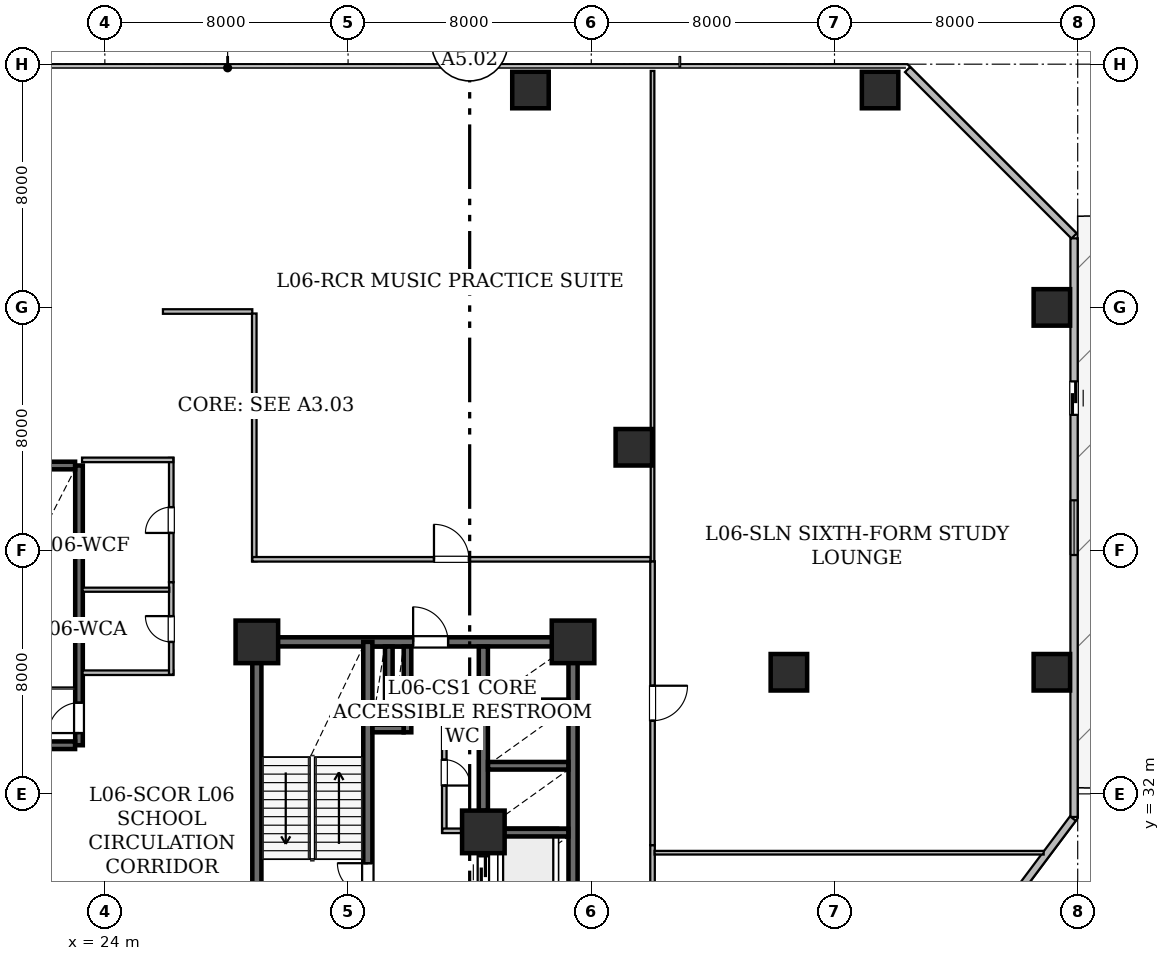
"""IFC4 building model, lengths in metres.
Left out: names, types, materials, properties, quantities, classifications, styles, units other than length and angle.
Written with IfcOpenShell. Run it as: python <this file> out.ifc"""

import sys

from ifc_helpers import new_model, si_unit, direction, frame, frame_2d, origin, origin_2d, place, context, subcontext, project, spatial, rectangle, hollow_rectangle, extrude, element, fill, save


model = new_model("IFC4")
c1 = context("Model", 3, precision=1e-05, world=origin(), true_north=direction((0.0, 1.0)))
c2 = subcontext(c1, "Body", "Model", "MODEL_VIEW")
j1 = project(units=[si_unit("LENGTHUNIT", "METRE"), si_unit("PLANEANGLEUNIT", "RADIAN")], contexts=[c1])
p1 = place(None, origin())
s1 = spatial("IfcSite", under=j1, at=p1, CompositionType="ELEMENT")
p2 = place(p1, origin())
s2 = spatial("IfcBuilding", under=s1, at=p2, CompositionType="ELEMENT")
p3 = place(p2, frame((0.0, 0.0, 28.8)))
s3 = spatial("IfcBuildingStorey", under=s2, at=p3, CompositionType="ELEMENT", Elevation=28.8)
for number, where, z_axis, x_axis in (
    (1, (29.0, 37.0, 0.0), (0.0, 0.0, 1.0), (1.0, 0.0, 0.0)),
    (2, (36.45, 30.75, 0.0), (0.0, 0.0, 1.0), (1.0, 0.0, 0.0)),
    (3, (39.4, 37.0, 0.0), (0.0, 0.0, 1.0), (1.0, 0.0, 0.0)),
):
    element("IfcColumn", number, at=place(p3, frame(where, z_axis=z_axis, x_axis=x_axis)), inside=s3, PredefinedType="COLUMN", context=c2, shape_type="SweptSolid", body=[
        extrude(hollow_rectangle(XDim=1.4, YDim=1.4, WallThickness=0.07, at=origin_2d()), origin(), (0.0, 0.0, 1.0), 4.5),
    ])
for number, where, z_axis, x_axis in (
    (4, (38.0, 55.15, 0.0), (0.0, 0.0, 1.0), (1.0, 0.0, 0.0)),
    (5, (49.5, 55.15, 0.0), (0.0, 0.0, 1.0), (1.0, 0.0, 0.0)),
    (6, (55.15, 36.0, 0.0), (0.0, 0.0, 1.0), (1.0, 0.0, 0.0)),
    (7, (55.15, 48.0, 0.0), (0.0, 0.0, 1.0), (1.0, 0.0, 0.0)),
    (8, (41.4, 43.4, 0.0), (0.0, 0.0, 1.0), (1.0, 0.0, 0.0)),
    (9, (46.5, 36.0, 0.0), (0.0, 0.0, 1.0), (1.0, 0.0, 0.0)),
):
    element("IfcColumn", number, at=place(p3, frame(where, z_axis=z_axis, x_axis=x_axis)), inside=s3, PredefinedType="COLUMN", context=c2, shape_type="SweptSolid", body=[
        extrude(hollow_rectangle(XDim=1.2, YDim=1.2, WallThickness=0.06, at=origin_2d()), origin(), (0.0, 0.0, 1.0), 4.475),
    ])
p4 = place(p3, frame((50.405, 55.825, 0.0), z_axis=(0.0, 0.0, 1.0), x_axis=(0.707106781187, -0.707106781187, 0.0)))
e10 = element("IfcWall", 10, at=p4, inside=s3, PredefinedType="STANDARD", context=c2, shape_type="SweptSolid", body=[
    extrude(rectangle(XDim=7.743, YDim=0.24, at=frame_2d((3.871, 0.0))), origin(), (0.0, 0.0, 1.0), 4.08),
])
p5 = place(p3, frame((55.88, 50.272, 0.0), z_axis=(0.0, 0.0, 1.0), x_axis=(0.0, -1.0, 0.0)))
e11 = element("IfcWall", 11, at=p5, inside=s3, PredefinedType="STANDARD", context=c2, shape_type="SweptSolid", body=[
    extrude(rectangle(XDim=19.032, YDim=0.24, at=frame_2d((9.516, 0.0))), origin(), (0.0, 0.0, 1.0), 4.08),
])
p6 = place(p5, frame((4.706, 0.0, 0.0)))
e12 = element("IfcOpeningElement", 12, at=p6, cuts=e11, PredefinedType="OPENING", context=c2, shape_type="SweptSolid", body=[
    extrude(rectangle(XDim=1.1, YDim=2.2, at=frame_2d((0.55, 1.1))), frame((0.0, 0.13, 0.0), z_axis=(0.0, -1.0, 0.0), x_axis=(1.0, 0.0, 0.0)), (0.0, 0.0, 1.0), 0.26),
])
p7 = place(p5, frame((8.616, 0.0, 0.85)))
e13 = element("IfcOpeningElement", 13, at=p7, cuts=e11, PredefinedType="OPENING", context=c2, shape_type="SweptSolid", body=[
    extrude(rectangle(XDim=1.8, YDim=0.92, at=frame_2d((0.9, 0.46))), frame((0.0, 0.13, 0.0), z_axis=(0.0, -1.0, 0.0), x_axis=(1.0, 0.0, 0.0)), (0.0, 0.0, 1.0), 0.26),
])
p8 = place(p3, frame((55.842, 31.189, 0.0), z_axis=(0.0, 0.0, 1.0), x_axis=(-0.600058791648, -0.799955902889, 0.0)))
e14 = element("IfcWall", 14, at=p8, inside=s3, PredefinedType="STANDARD", context=c2, shape_type="SweptSolid", body=[
    extrude(rectangle(XDim=3.986, YDim=0.24, at=frame_2d((1.993, 0.0))), origin(), (0.0, 0.0, 1.0), 4.08),
])
p9 = place(p3, frame((29.0, 28.0, 0.0), z_axis=(0.0, 0.0, 1.0), x_axis=(0.0, 1.0, 0.0)))
e15 = element("IfcWall", 15, at=p9, inside=s3, PredefinedType="SHEAR", context=c2, shape_type="SweptSolid", body=[
    extrude(rectangle(XDim=9.0, YDim=0.3, at=frame_2d((4.5, 0.0))), origin(), (0.0, 0.0, 1.0), 4.08),
])
p10 = place(p3, frame((29.0, 37.0, 0.0), z_axis=(0.0, 0.0, 1.0), x_axis=(1.0, 0.0, 0.0)))
e16 = element("IfcWall", 16, at=p10, inside=s3, PredefinedType="SHEAR", context=c2, shape_type="SweptSolid", body=[
    extrude(rectangle(XDim=10.4, YDim=0.3, at=frame_2d((5.2, 0.0))), origin(), (0.0, 0.0, 1.0), 4.08),
])
p11 = place(p10, frame((5.14, 0.0, 0.0)))
e17 = element("IfcOpeningElement", 17, at=p11, cuts=e16, PredefinedType="OPENING", context=c2, shape_type="SweptSolid", body=[
    extrude(rectangle(XDim=1.15, YDim=2.2, at=frame_2d((0.575, 1.1))), frame((0.0, 0.16, 0.0), z_axis=(0.0, -1.0, 0.0), x_axis=(1.0, 0.0, 0.0)), (0.0, 0.0, 1.0), 0.32),
])
p12 = place(p3, frame((39.4, 24.4, 0.0), z_axis=(0.0, 0.0, 1.0), x_axis=(0.0, 1.0, 0.0)))
e18 = element("IfcWall", 18, at=p12, inside=s3, PredefinedType="SHEAR", context=c2, shape_type="SweptSolid", body=[
    extrude(rectangle(XDim=12.6, YDim=0.3, at=frame_2d((6.3, 0.0))), origin(), (0.0, 0.0, 1.0), 4.08),
])
p13 = place(p3, frame((32.65, 28.0, 0.0), z_axis=(0.0, 0.0, 1.0), x_axis=(0.0, 1.0, 0.0)))
e19 = element("IfcWall", 19, at=p13, inside=s3, PredefinedType="SHEAR", context=c2, shape_type="SweptSolid", body=[
    extrude(rectangle(XDim=9.0, YDim=0.3, at=frame_2d((4.5, 0.0))), origin(), (0.0, 0.0, 1.0), 4.08),
])
p14 = place(p13, frame((0.72, 0.0, 0.0)))
e20 = element("IfcOpeningElement", 20, at=p14, cuts=e19, PredefinedType="OPENING", context=c2, shape_type="SweptSolid", body=[
    extrude(rectangle(XDim=1.0, YDim=2.15, at=frame_2d((0.5, 1.075))), frame((0.0, 0.16, 0.0), z_axis=(0.0, -1.0, 0.0), x_axis=(1.0, 0.0, 0.0)), (0.0, 0.0, 1.0), 0.32),
])
p15 = place(p3, frame((36.45, 25.1, 0.0), z_axis=(0.0, 0.0, 1.0), x_axis=(0.0, 1.0, 0.0)))
e21 = element("IfcWall", 21, at=p15, inside=s3, PredefinedType="SHEAR", context=c2, shape_type="SweptSolid", body=[
    extrude(rectangle(XDim=4.95, YDim=0.3, at=frame_2d((2.475, 0.0))), origin(), (0.0, 0.0, 1.0), 4.08),
])
p16 = place(p15, frame((0.12, 0.0, 0.0)))
e22 = element("IfcOpeningElement", 22, at=p16, cuts=e21, PredefinedType="OPENING", context=c2, shape_type="SweptSolid", body=[
    extrude(rectangle(XDim=1.05, YDim=2.15, at=frame_2d((0.525, 1.075))), frame((0.0, 0.16, 0.0), z_axis=(0.0, -1.0, 0.0), x_axis=(1.0, 0.0, 0.0)), (0.0, 0.0, 1.0), 0.32),
])
p17 = place(p15, frame((1.995, 0.0, 0.0)))
e23 = element("IfcOpeningElement", 23, at=p17, cuts=e21, PredefinedType="OPENING", context=c2, shape_type="SweptSolid", body=[
    extrude(rectangle(XDim=1.05, YDim=2.15, at=frame_2d((0.525, 1.075))), frame((0.0, 0.16, 0.0), z_axis=(0.0, -1.0, 0.0), x_axis=(1.0, 0.0, 0.0)), (0.0, 0.0, 1.0), 0.32),
])
p18 = place(p15, frame((3.795, 0.0, 0.0)))
e24 = element("IfcOpeningElement", 24, at=p18, cuts=e21, PredefinedType="OPENING", context=c2, shape_type="SweptSolid", body=[
    extrude(rectangle(XDim=1.05, YDim=2.15, at=frame_2d((0.525, 1.075))), frame((0.0, 0.16, 0.0), z_axis=(0.0, -1.0, 0.0), x_axis=(1.0, 0.0, 0.0)), (0.0, 0.0, 1.0), 0.32),
])
p19 = place(p3, frame((36.45, 31.45, 0.0), z_axis=(0.0, 0.0, 1.0), x_axis=(0.0, 1.0, 0.0)))
e25 = element("IfcWall", 25, at=p19, inside=s3, PredefinedType="SHEAR", context=c2, shape_type="SweptSolid", body=[
    extrude(rectangle(XDim=5.396, YDim=0.3, at=frame_2d((2.698, 0.0))), origin(), (0.0, 0.0, 1.0), 4.08),
])
for number, where, z_axis, x_axis in (
    (26, (36.604, 30.725, 0.0), (0.0, 0.0, 1.0), (1.0, 0.0, 0.0)),
    (27, (36.604, 32.925, 0.0), (0.0, 0.0, 1.0), (1.0, 0.0, 0.0)),
    (28, (36.604, 34.975, 0.0), (0.0, 0.0, 1.0), (1.0, 0.0, 0.0)),
):
    element("IfcWall", number, at=place(p3, frame(where, z_axis=z_axis, x_axis=x_axis)), inside=s3, PredefinedType="SHEAR", context=c2, shape_type="SweptSolid", body=[
        extrude(rectangle(XDim=2.642, YDim=0.25, at=frame_2d((1.321, 0.0))), origin(), (0.0, 0.0, 1.0), 4.08),
    ])
p20 = place(p3, frame((33.955, 34.025, 0.0), z_axis=(0.0, 0.0, 1.0), x_axis=(0.0, 1.0, 0.0)))
e29 = element("IfcWall", 29, at=p20, inside=s3, PredefinedType="SHEAR", context=c2, shape_type="SweptSolid", body=[
    extrude(rectangle(XDim=2.821, YDim=0.25, at=frame_2d((1.411, 0.0))), origin(), (0.0, 0.0, 1.0), 4.08),
])
p21 = place(p3, frame((32.804, 34.15, 0.0), z_axis=(0.0, 0.0, 1.0), x_axis=(1.0, 0.0, 0.0)))
e30 = element("IfcWall", 30, at=p21, inside=s3, PredefinedType="SHEAR", context=c2, shape_type="SweptSolid", body=[
    extrude(rectangle(XDim=1.022, YDim=0.25, at=frame_2d((0.511, 0.0))), origin(), (0.0, 0.0, 1.0), 4.08),
])
p22 = place(p3, frame((33.34, 34.279, 0.0), z_axis=(0.0, 0.0, 1.0), x_axis=(0.0, 1.0, 0.0)))
e31 = element("IfcWall", 31, at=p22, inside=s3, PredefinedType="SHEAR", context=c2, shape_type="SweptSolid", body=[
    extrude(rectangle(XDim=2.567, YDim=0.25, at=frame_2d((1.283, 0.0))), origin(), (0.0, 0.0, 1.0), 4.08),
])
p23 = place(p3, frame((23.15, 33.6, 0.0), z_axis=(0.0, 0.0, 1.0), x_axis=(0.0, 1.0, 0.0)))
e32 = element("IfcWall", 32, at=p23, inside=s3, PredefinedType="SHEAR", context=c2, shape_type="SweptSolid", body=[
    extrude(rectangle(XDim=9.2, YDim=0.25, at=frame_2d((4.6, 0.0))), origin(), (0.0, 0.0, 1.0), 4.08),
])
p24 = place(p23, frame((0.4, 0.0, 0.0)))
e33 = element("IfcOpeningElement", 33, at=p24, cuts=e32, PredefinedType="OPENING", context=c2, shape_type="SweptSolid", body=[
    extrude(rectangle(XDim=1.0, YDim=2.15, at=frame_2d((0.5, 1.075))), frame((0.0, 0.135, 0.0), z_axis=(0.0, -1.0, 0.0), x_axis=(1.0, 0.0, 0.0)), (0.0, 0.0, 1.0), 0.27),
])
for number, where, z_axis, x_axis in (
    (34, (19.329, 33.6, 0.0), (0.0, 0.0, 1.0), (1.0, 0.0, 0.0)),
    (35, (19.329, 42.8, 0.0), (0.0, 0.0, 1.0), (1.0, 0.0, 0.0)),
):
    element("IfcWall", number, at=place(p3, frame(where, z_axis=z_axis, x_axis=x_axis)), inside=s3, PredefinedType="SHEAR", context=c2, shape_type="SweptSolid", body=[
        extrude(rectangle(XDim=3.692, YDim=0.25, at=frame_2d((1.846, 0.0))), origin(), (0.0, 0.0, 1.0), 4.08),
    ])
p25 = place(p3, frame((36.306, 34.615, 0.0), z_axis=(0.0, 0.0, 1.0), x_axis=(-1.0, 0.0, 0.0)))
e36 = element("IfcWall", 36, at=p25, inside=s3, PredefinedType="STANDARD", context=c2, shape_type="SweptSolid", body=[
    extrude(rectangle(XDim=1.206, YDim=0.15, at=frame_2d((0.603, 0.0))), origin(), (0.0, 0.0, 1.0), 4.08),
])
p26 = place(p3, frame((35.165, 34.678, 0.0), z_axis=(0.0, 0.0, 1.0), x_axis=(0.0, -1.0, 0.0)))
e37 = element("IfcWall", 37, at=p26, inside=s3, PredefinedType="STANDARD", context=c2, shape_type="SweptSolid", body=[
    extrude(rectangle(XDim=3.958, YDim=0.15, at=frame_2d((1.979, 0.0))), origin(), (0.0, 0.0, 1.0), 4.08),
])
p27 = place(p26, frame((1.554, 0.0, 0.0)))
e38 = element("IfcOpeningElement", 38, at=p27, cuts=e37, PredefinedType="OPENING", context=c2, shape_type="SweptSolid", body=[
    extrude(rectangle(XDim=0.85, YDim=2.1, at=frame_2d((0.425, 1.05))), frame((0.0, 0.085, 0.0), z_axis=(0.0, -1.0, 0.0), x_axis=(1.0, 0.0, 0.0)), (0.0, 0.0, 1.0), 0.17),
])
p28 = place(p3, frame((35.102, 30.785, 0.0), z_axis=(0.0, 0.0, 1.0), x_axis=(1.0, 0.0, 0.0)))
e39 = element("IfcWall", 39, at=p28, inside=s3, PredefinedType="STANDARD", context=c2, shape_type="SweptSolid", body=[
    extrude(rectangle(XDim=1.198, YDim=0.15, at=frame_2d((0.599, 0.0))), origin(), (0.0, 0.0, 1.0), 4.08),
])
p29 = place(p3, frame((23.267, 35.985, 0.0), z_axis=(0.0, 0.0, 1.0), x_axis=(1.0, 0.0, 0.0)))
e40 = element("IfcWall", 40, at=p29, inside=s3, PredefinedType="STANDARD", context=c2, shape_type="SweptSolid", body=[
    extrude(rectangle(XDim=2.983, YDim=0.15, at=frame_2d((1.491, 0.0))), origin(), (0.0, 0.0, 1.0), 4.08),
])
p30 = place(p3, frame((26.185, 35.922, 0.0), z_axis=(0.0, 0.0, 1.0), x_axis=(0.0, 1.0, 0.0)))
e41 = element("IfcWall", 41, at=p30, inside=s3, PredefinedType="STANDARD", context=c2, shape_type="SweptSolid", body=[
    extrude(rectangle(XDim=3.042, YDim=0.15, at=frame_2d((1.521, 0.0))), origin(), (0.0, 0.0, 1.0), 4.08),
])
p31 = place(p30, frame((1.075, 0.0, 0.0)))
e42 = element("IfcOpeningElement", 42, at=p31, cuts=e41, PredefinedType="OPENING", context=c2, shape_type="SweptSolid", body=[
    extrude(rectangle(XDim=0.85, YDim=2.1, at=frame_2d((0.425, 1.05))), frame((0.0, 0.085, 0.0), z_axis=(0.0, -1.0, 0.0), x_axis=(1.0, 0.0, 0.0)), (0.0, 0.0, 1.0), 0.17),
])
p32 = place(p3, frame((26.185, 38.964, 0.0), z_axis=(0.0, 0.0, 1.0), x_axis=(0.0, 1.0, 0.0)))
e43 = element("IfcWall", 43, at=p32, inside=s3, PredefinedType="STANDARD", context=c2, shape_type="SweptSolid", body=[
    extrude(rectangle(XDim=4.086, YDim=0.15, at=frame_2d((2.043, 0.0))), origin(), (0.0, 0.0, 1.0), 2.67),
])
p33 = place(p32, frame((1.618, 0.0, 0.0)))
e44 = element("IfcOpeningElement", 44, at=p33, cuts=e43, PredefinedType="OPENING", context=c2, shape_type="SweptSolid", body=[
    extrude(rectangle(XDim=0.85, YDim=2.1, at=frame_2d((0.425, 1.05))), frame((0.0, 0.085, 0.0), z_axis=(0.0, -1.0, 0.0), x_axis=(1.0, 0.0, 0.0)), (0.0, 0.0, 1.0), 0.17),
])
p34 = place(p3, frame((26.25, 42.985, 0.0), z_axis=(0.0, 0.0, 1.0), x_axis=(-1.0, 0.0, 0.0)))
e45 = element("IfcWall", 45, at=p34, inside=s3, PredefinedType="STANDARD", context=c2, shape_type="SweptSolid", body=[
    extrude(rectangle(XDim=3.0, YDim=0.15, at=frame_2d((1.5, 0.0))), origin(), (0.0, 0.0, 1.0), 2.67),
])
p35 = place(p3, frame((42.015, 30.314, 0.0), z_axis=(0.0, 0.0, 1.0), x_axis=(0.0, -1.0, 0.0)))
e46 = element("IfcWall", 46, at=p35, inside=s3, PredefinedType="STANDARD", context=c2, shape_type="SweptSolid", body=[
    extrude(rectangle(XDim=13.964, YDim=0.15, at=frame_2d((6.982, 0.0))), origin(), (0.0, 0.0, 1.0), 2.67),
])
p36 = place(p35, frame((6.428, 0.0, 0.0)))
e47 = element("IfcOpeningElement", 47, at=p36, cuts=e46, PredefinedType="OPENING", context=c2, shape_type="SweptSolid", body=[
    extrude(rectangle(XDim=1.15, YDim=2.2, at=frame_2d((0.575, 1.1))), frame((0.0, 0.085, 0.0), z_axis=(0.0, -1.0, 0.0), x_axis=(1.0, 0.0, 0.0)), (0.0, 0.0, 1.0), 0.17),
])
p37 = place(p3, frame((42.015, 39.65, 0.0), z_axis=(0.0, 0.0, 1.0), x_axis=(0.0, -1.0, 0.0)))
e48 = element("IfcWall", 48, at=p37, inside=s3, PredefinedType="STANDARD", context=c2, shape_type="SweptSolid", body=[
    extrude(rectangle(XDim=9.336, YDim=0.15, at=frame_2d((4.668, 0.0))), origin(), (0.0, 0.0, 1.0), 2.67),
])
p38 = place(p37, frame((4.093, 0.0, 0.0)))
e49 = element("IfcOpeningElement", 49, at=p38, cuts=e48, PredefinedType="OPENING", context=c2, shape_type="SweptSolid", body=[
    extrude(rectangle(XDim=1.15, YDim=2.2, at=frame_2d((0.575, 1.1))), frame((0.0, 0.085, 0.0), z_axis=(0.0, -1.0, 0.0), x_axis=(1.0, 0.0, 0.0)), (0.0, 0.0, 1.0), 0.17),
])
p39 = place(p3, frame((25.911, 47.865, 0.0), z_axis=(0.0, 0.0, 1.0), x_axis=(1.0, 0.0, 0.0)))
e50 = element("IfcWall", 50, at=p39, inside=s3, PredefinedType="STANDARD", context=c2, shape_type="SweptSolid", body=[
    extrude(rectangle(XDim=2.939, YDim=0.15, at=frame_2d((1.47, 0.0))), origin(), (0.0, 0.0, 1.0), 4.08),
])
p40 = place(p3, frame((28.915, 47.8, 0.0), z_axis=(0.0, 0.0, 1.0), x_axis=(0.0, -1.0, 0.0)))
e51 = element("IfcWall", 51, at=p40, inside=s3, PredefinedType="STANDARD", context=c2, shape_type="SweptSolid", body=[
    extrude(rectangle(XDim=8.15, YDim=0.15, at=frame_2d((4.075, 0.0))), origin(), (0.0, 0.0, 1.0), 2.67),
])
p41 = place(p3, frame((28.852, 39.715, 0.0), z_axis=(0.0, 0.0, 1.0), x_axis=(1.0, 0.0, 0.0)))
e52 = element("IfcWall", 52, at=p41, inside=s3, PredefinedType="STANDARD", context=c2, shape_type="SweptSolid", body=[
    extrude(rectangle(XDim=13.098, YDim=0.15, at=frame_2d((6.549, 0.0))), origin(), (0.0, 0.0, 1.0), 2.67),
])
p42 = place(p41, frame((5.974, 0.0, 0.0)))
e53 = element("IfcOpeningElement", 53, at=p42, cuts=e52, PredefinedType="OPENING", context=c2, shape_type="SweptSolid", body=[
    extrude(rectangle(XDim=1.15, YDim=2.2, at=frame_2d((0.575, 1.1))), frame((0.0, 0.085, 0.0), z_axis=(0.0, -1.0, 0.0), x_axis=(1.0, 0.0, 0.0)), (0.0, 0.0, 1.0), 0.17),
])
p43 = place(p3, frame((23.267, 38.715, 0.0), z_axis=(0.0, 0.0, 1.0), x_axis=(1.0, 0.0, 0.0)))
e54 = element("IfcWall", 54, at=p43, inside=s3, PredefinedType="PARTITIONING", context=c2, shape_type="SweptSolid", body=[
    extrude(rectangle(XDim=2.851, YDim=0.135, at=frame_2d((1.425, 0.0))), origin(), (0.0, 0.0, 1.0), 4.08),
])
p44 = place(p3, frame((42.082, 30.065, 0.0), z_axis=(0.0, 0.0, 1.0), x_axis=(1.0, 0.0, 0.0)))
e55 = element("IfcWall", 55, at=p44, inside=s3, PredefinedType="PARTITIONING", context=c2, shape_type="SweptSolid", body=[
    extrude(rectangle(XDim=12.798, YDim=0.12, at=frame_2d((6.399, 0.0))), origin(), (0.0, 0.0, 1.0), 2.67),
])
p45 = place(p3, frame((42.015, 39.65, 0.0), z_axis=(0.0, 0.0, 1.0), x_axis=(0.0, 1.0, 0.0)))
e56 = element("IfcWall", 56, at=p45, inside=s3, PredefinedType="PARTITIONING", context=c2, shape_type="SweptSolid", body=[
    extrude(rectangle(XDim=16.128, YDim=0.12, at=frame_2d((8.064, 0.0))), origin(), (0.0, 0.0, 1.0), 2.67),
])
p46 = place(p6, origin())
e57 = element("IfcDoor", 57, at=p46, inside=s3, OperationType="SLIDING_TO_LEFT", PredefinedType="DOOR", context=c2, shape_type="SweptSolid", body=[
    extrude(rectangle(XDim=1.1, YDim=2.2, at=frame_2d((0.55, 1.1))), frame((0.0, 0.025, 0.0), z_axis=(0.0, -1.0, 0.0), x_axis=(1.0, 0.0, 0.0)), (0.0, 0.0, 1.0), 0.05),
])
fill(e12, e57)
p47 = place(p7, origin())
e58 = element("IfcWindow", 58, at=p47, inside=s3, PartitioningType="SINGLE_PANEL", PredefinedType="WINDOW", context=c2, shape_type="SweptSolid", body=[
    extrude(rectangle(XDim=1.8, YDim=0.92, at=frame_2d((0.9, 0.46))), frame((0.0, 0.03, 0.0), z_axis=(0.0, -1.0, 0.0), x_axis=(1.0, 0.0, 0.0)), (0.0, 0.0, 1.0), 0.06),
])
fill(e13, e58)
p48 = place(p14, origin())
e59 = element("IfcDoor", 59, at=p48, inside=s3, OperationType="SINGLE_SWING_RIGHT", PredefinedType="DOOR", context=c2, shape_type="SweptSolid", body=[
    extrude(rectangle(XDim=1.0, YDim=2.15, at=frame_2d((0.5, 1.075))), frame((0.0, 0.025, 0.0), z_axis=(0.0, -1.0, 0.0), x_axis=(1.0, 0.0, 0.0)), (0.0, 0.0, 1.0), 0.05),
])
fill(e20, e59)
p49 = place(p11, origin())
e60 = element("IfcDoor", 60, at=p49, inside=s3, OperationType="SINGLE_SWING_LEFT", PredefinedType="DOOR", context=c2, shape_type="SweptSolid", body=[
    extrude(rectangle(XDim=1.15, YDim=2.2, at=frame_2d((0.575, 1.1))), frame((0.0, 0.025, 0.0), z_axis=(0.0, -1.0, 0.0), x_axis=(1.0, 0.0, 0.0)), (0.0, 0.0, 1.0), 0.05),
])
fill(e17, e60)
p50 = place(p18, origin())
e61 = element("IfcDoor", 61, at=p50, inside=s3, OperationType="SLIDING_TO_LEFT", PredefinedType="DOOR", context=c2, shape_type="SweptSolid", body=[
    extrude(rectangle(XDim=1.05, YDim=2.15, at=frame_2d((0.525, 1.075))), frame((0.0, 0.025, 0.0), z_axis=(0.0, -1.0, 0.0), x_axis=(1.0, 0.0, 0.0)), (0.0, 0.0, 1.0), 0.05),
])
fill(e24, e61)
p51 = place(p24, origin())
e62 = element("IfcDoor", 62, at=p51, inside=s3, OperationType="SINGLE_SWING_LEFT", PredefinedType="DOOR", context=c2, shape_type="SweptSolid", body=[
    extrude(rectangle(XDim=1.0, YDim=2.15, at=frame_2d((0.5, 1.075))), frame((0.0, 0.025, 0.0), z_axis=(0.0, -1.0, 0.0), x_axis=(1.0, 0.0, 0.0)), (0.0, 0.0, 1.0), 0.05),
])
fill(e33, e62)
p52 = place(p27, origin())
e63 = element("IfcDoor", 63, at=p52, inside=s3, OperationType="SINGLE_SWING_RIGHT", PredefinedType="DOOR", context=c2, shape_type="SweptSolid", body=[
    extrude(rectangle(XDim=0.85, YDim=2.1, at=frame_2d((0.425, 1.05))), frame((0.0, 0.025, 0.0), z_axis=(0.0, -1.0, 0.0), x_axis=(1.0, 0.0, 0.0)), (0.0, 0.0, 1.0), 0.05),
])
fill(e38, e63)
p53 = place(p31, origin())
e64 = element("IfcDoor", 64, at=p53, inside=s3, OperationType="SINGLE_SWING_RIGHT", PredefinedType="DOOR", context=c2, shape_type="SweptSolid", body=[
    extrude(rectangle(XDim=0.85, YDim=2.1, at=frame_2d((0.425, 1.05))), frame((0.0, 0.025, 0.0), z_axis=(0.0, -1.0, 0.0), x_axis=(1.0, 0.0, 0.0)), (0.0, 0.0, 1.0), 0.05),
])
fill(e42, e64)
p54 = place(p33, origin())
e65 = element("IfcDoor", 65, at=p54, inside=s3, OperationType="SINGLE_SWING_LEFT", PredefinedType="DOOR", context=c2, shape_type="SweptSolid", body=[
    extrude(rectangle(XDim=0.85, YDim=2.1, at=frame_2d((0.425, 1.05))), frame((0.0, 0.025, 0.0), z_axis=(0.0, -1.0, 0.0), x_axis=(1.0, 0.0, 0.0)), (0.0, 0.0, 1.0), 0.05),
])
fill(e44, e65)
p55 = place(p38, origin())
e66 = element("IfcDoor", 66, at=p55, inside=s3, OperationType="SINGLE_SWING_LEFT", PredefinedType="DOOR", context=c2, shape_type="SweptSolid", body=[
    extrude(rectangle(XDim=1.15, YDim=2.2, at=frame_2d((0.575, 1.1))), frame((0.0, 0.025, 0.0), z_axis=(0.0, -1.0, 0.0), x_axis=(1.0, 0.0, 0.0)), (0.0, 0.0, 1.0), 0.05),
])
fill(e49, e66)
p56 = place(p42, origin())
e67 = element("IfcDoor", 67, at=p56, inside=s3, OperationType="SINGLE_SWING_LEFT", PredefinedType="DOOR", context=c2, shape_type="SweptSolid", body=[
    extrude(rectangle(XDim=1.15, YDim=2.2, at=frame_2d((0.575, 1.1))), frame((0.0, 0.025, 0.0), z_axis=(0.0, -1.0, 0.0), x_axis=(1.0, 0.0, 0.0)), (0.0, 0.0, 1.0), 0.05),
])
fill(e53, e67)
save(model, sys.argv[1])
